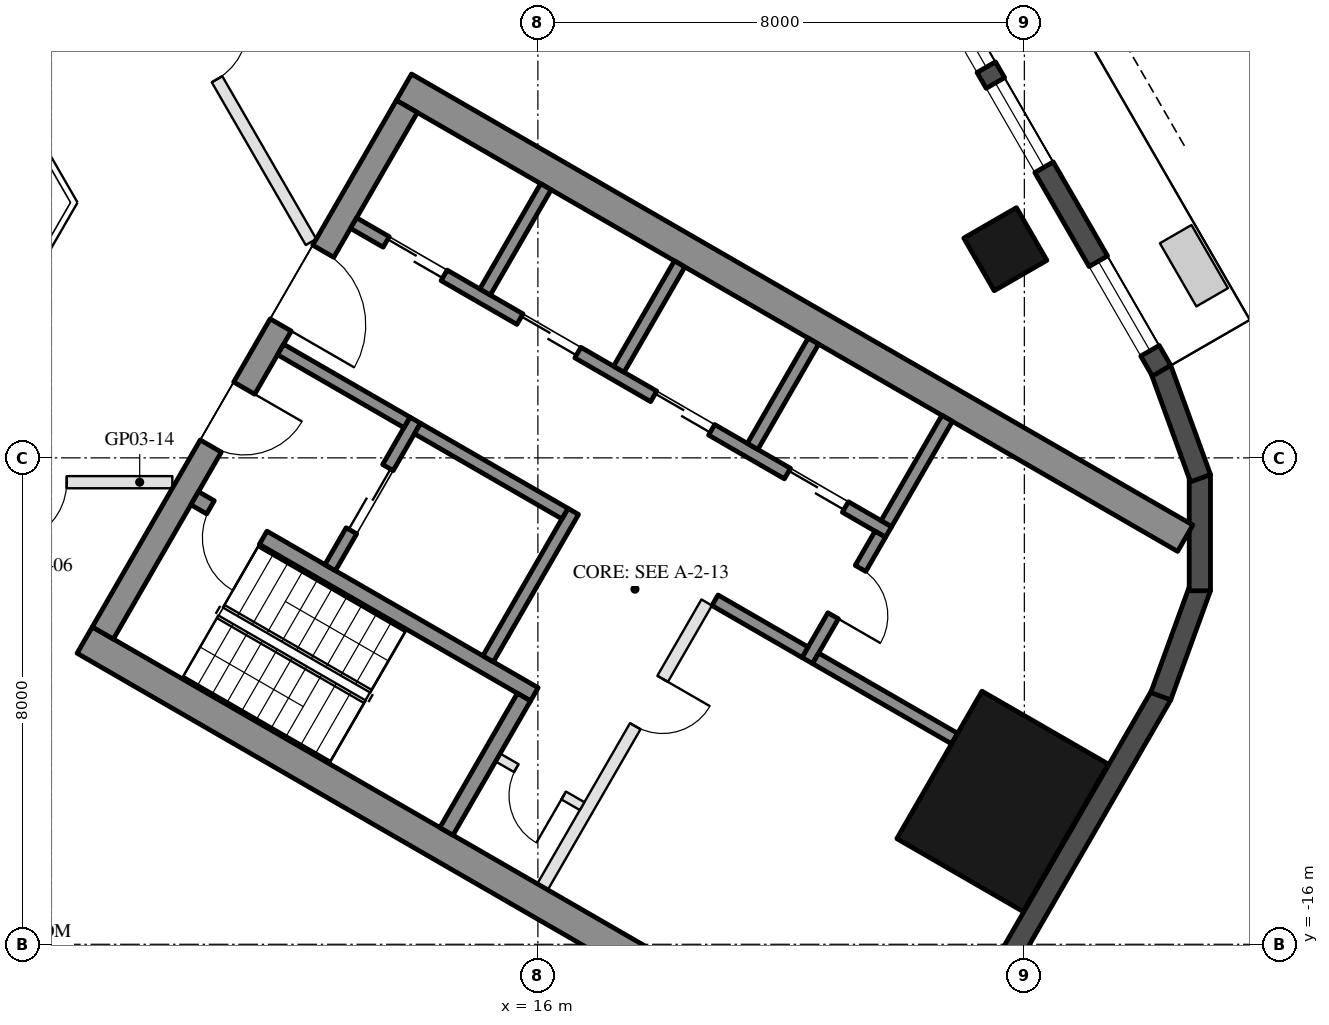
"""IFC4 building model, lengths in metres.
Left out: names, types, materials, properties, quantities, classifications, styles, units other than length and angle.
Written with IfcOpenShell. Run it as: python <this file> out.ifc"""

import sys

from ifc_helpers import new_model, si_unit, direction, frame, frame_2d, origin, origin_2d, place, context, subcontext, project, spatial, rectangle, hollow_rectangle, extrude, element, fill, save


model = new_model("IFC4")
c1 = context("Model", 3, precision=1e-05, world=origin(), true_north=direction((0.0, 1.0)))
c2 = subcontext(c1, "Body", "Model", "MODEL_VIEW")
j1 = project(units=[si_unit("LENGTHUNIT", "METRE"), si_unit("PLANEANGLEUNIT", "RADIAN")], contexts=[c1])
p1 = place(None, origin())
s1 = spatial("IfcSite", under=j1, at=p1, CompositionType="ELEMENT")
p2 = place(p1, origin())
s2 = spatial("IfcBuilding", under=s1, at=p2, CompositionType="ELEMENT")
p3 = place(p2, frame((0.0, 0.0, 61.3)))
s3 = spatial("IfcBuildingStorey", under=s2, at=p3, CompositionType="ELEMENT", Elevation=61.3)
p4 = place(p3, frame((23.688, -4.568, 0.0), z_axis=(0.0, 0.0, 1.0), x_axis=(-0.5, 0.866025403784, 0.0)))
e1 = element("IfcColumn", 1, at=p4, inside=s3, PredefinedType="COLUMN", context=c2, shape_type="SweptSolid", body=[
    extrude(hollow_rectangle(XDim=1.0, YDim=1.0, WallThickness=0.045, at=origin_2d()), origin(), (0.0, 0.0, 1.0), 3.7),
])
p5 = place(p3, frame((23.643, -13.65, 0.0), z_axis=(0.0, 0.0, 1.0), x_axis=(0.5, 0.866025403784, 0.0)))
e2 = element("IfcColumn", 2, at=p5, inside=s3, PredefinedType="COLUMN", context=c2, shape_type="SweptSolid", body=[
    extrude(hollow_rectangle(XDim=2.8, YDim=2.4, WallThickness=0.07, at=origin_2d()), origin(), (0.0, 0.0, 1.0), 3.7),
])
p6 = place(p3, frame((23.427, -16.792, 0.0), z_axis=(0.0, 0.0, 1.0), x_axis=(0.500018773155, 0.866014564827, 0.0)))
e3 = element("IfcWall", 3, at=p6, inside=s3, PredefinedType="SOLIDWALL", context=c2, shape_type="SweptSolid", body=[
    extrude(rectangle(XDim=5.658, YDim=0.35, at=frame_2d((2.829, 0.0))), origin(), (0.0, 0.0, 1.0), 3.55),
])
for number, where, z_axis, x_axis in (
    (4, (26.244, -11.92, 0.0), (0.0, 0.0, 1.0), (0.342, 0.94, 0.0)),
    (5, (26.886, -10.185, 0.0), (0.0, 0.0, 1.0), (0.0, 1.0, 0.0)),
    (6, (26.897, -8.335, 0.0), (0.0, 0.0, 1.0), (-0.342, 0.94, 0.0)),
):
    element("IfcWall", number, at=place(p3, frame(where, z_axis=z_axis, x_axis=x_axis)), inside=s3, PredefinedType="SOLIDWALL", context=c2, shape_type="SweptSolid", body=[
        extrude(rectangle(XDim=1.91, YDim=0.35, at=frame_2d((0.955, 0.0))), origin(), (0.0, 0.0, 1.0), 3.55),
    ])
p7 = place(p3, frame((26.257, -6.567, 0.0), z_axis=(0.0, 0.0, 1.0), x_axis=(-0.500023526245, 0.866011820475, 0.0)))
e7 = element("IfcWall", 7, at=p7, inside=s3, PredefinedType="SOLIDWALL", context=c2, shape_type="SweptSolid", body=[
    extrude(rectangle(XDim=11.816, YDim=0.35, at=frame_2d((5.908, 0.0))), origin(), (0.0, 0.0, 1.0), 3.55),
])
p8 = place(p7, frame((0.38, 0.0, 0.3)))
e8 = element("IfcOpeningElement", 8, at=p8, cuts=e7, PredefinedType="OPENING", context=c2, shape_type="SweptSolid", body=[
    extrude(rectangle(XDim=1.7, YDim=2.65, at=frame_2d((0.85, 1.325))), frame((0.0, 0.185, 0.0), z_axis=(0.0, -1.0, 0.0), x_axis=(1.0, 0.0, 0.0)), (0.0, 0.0, 1.0), 0.37),
])
p9 = place(p7, frame((7.666, 0.0, 0.0)))
e9 = element("IfcOpeningElement", 9, at=p9, cuts=e7, PredefinedType="OPENING", context=c2, shape_type="SweptSolid", body=[
    extrude(rectangle(XDim=2.4, YDim=2.4, at=frame_2d((1.2, 1.2))), frame((0.0, 0.185, 0.0), z_axis=(0.0, -1.0, 0.0), x_axis=(1.0, 0.0, 0.0)), (0.0, 0.0, 1.0), 0.37),
])
p10 = place(p7, frame((3.865, 0.0, 0.3)))
e10 = element("IfcOpeningElement", 10, at=p10, cuts=e7, PredefinedType="OPENING", context=c2, shape_type="SweptSolid", body=[
    extrude(rectangle(XDim=1.6, YDim=2.65, at=frame_2d((0.8, 1.325))), frame((0.0, 0.185, 0.0), z_axis=(0.0, -1.0, 0.0), x_axis=(1.0, 0.0, 0.0)), (0.0, 0.0, 1.0), 0.37),
])
p11 = place(p7, frame((5.765, 0.0, 0.3)))
e11 = element("IfcOpeningElement", 11, at=p11, cuts=e7, PredefinedType="OPENING", context=c2, shape_type="SweptSolid", body=[
    extrude(rectangle(XDim=1.6, YDim=2.65, at=frame_2d((0.8, 1.325))), frame((0.0, 0.185, 0.0), z_axis=(0.0, -1.0, 0.0), x_axis=(1.0, 0.0, 0.0)), (0.0, 0.0, 1.0), 0.37),
])
for number, where, z_axis, x_axis in (
    (12, (8.547, -10.997, 0.0), (0.0, 0.0, 1.0), (0.866, -0.5, 0.0)),
    (13, (13.797, -1.903, 0.0), (0.0, 0.0, 1.0), (0.866, -0.5, 0.0)),
):
    element("IfcWall", number, at=place(p3, frame(where, z_axis=z_axis, x_axis=x_axis)), inside=s3, PredefinedType="SHEAR", context=c2, shape_type="SweptSolid", body=[
        extrude(rectangle(XDim=14.837, YDim=0.5, at=frame_2d((7.418, 0.0))), origin(), (0.0, 0.0, 1.0), 3.5),
    ])
p12 = place(p3, frame((8.845, -10.88, 0.0), z_axis=(0.0, 0.0, 1.0), x_axis=(0.500004234368, 0.866022959057, 0.0)))
e14 = element("IfcWall", 14, at=p12, inside=s3, PredefinedType="SHEAR", context=c2, shape_type="SweptSolid", body=[
    extrude(rectangle(XDim=10.0, YDim=0.4, at=frame_2d((5.0, 0.0))), origin(), (0.0, 0.0, 1.0), 3.5),
])
p13 = place(p12, frame((3.55, 0.0, 0.0)))
e15 = element("IfcOpeningElement", 15, at=p13, cuts=e14, PredefinedType="OPENING", context=c2, shape_type="SweptSolid", body=[
    extrude(rectangle(XDim=1.1, YDim=2.1, at=frame_2d((0.55, 1.05))), frame((0.0, 0.21, 0.0), z_axis=(0.0, -1.0, 0.0), x_axis=(1.0, 0.0, 0.0)), (0.0, 0.0, 1.0), 0.42),
])
p14 = place(p12, frame((5.85, 0.0, 0.0)))
e16 = element("IfcOpeningElement", 16, at=p14, cuts=e14, PredefinedType="OPENING", context=c2, shape_type="SweptSolid", body=[
    extrude(rectangle(XDim=1.4, YDim=2.1, at=frame_2d((0.7, 1.05))), frame((0.0, 0.21, 0.0), z_axis=(0.0, -1.0, 0.0), x_axis=(1.0, 0.0, 0.0)), (0.0, 0.0, 1.0), 0.42),
])
p15 = place(p3, frame((10.356, -8.664, 0.0), z_axis=(0.0, 0.0, 1.0), x_axis=(0.866028629588, -0.499994412703, 0.0)))
e17 = element("IfcWall", 17, at=p15, inside=s3, PredefinedType="SHEAR", context=c2, shape_type="SweptSolid", body=[
    extrude(rectangle(XDim=6.45, YDim=0.25, at=frame_2d((3.225, 0.0))), origin(), (0.0, 0.0, 1.0), 3.5),
])
p16 = place(p15, frame((0.3, 0.0, 0.0)))
e18 = element("IfcOpeningElement", 18, at=p16, cuts=e17, PredefinedType="OPENING", context=c2, shape_type="SweptSolid", body=[
    extrude(rectangle(XDim=1.0, YDim=2.1, at=frame_2d((0.5, 1.05))), frame((0.0, 0.135, 0.0), z_axis=(0.0, -1.0, 0.0), x_axis=(1.0, 0.0, 0.0)), (0.0, 0.0, 1.0), 0.27),
])
p17 = place(p3, frame((14.496, -14.143, 0.0), z_axis=(0.0, 0.0, 1.0), x_axis=(0.500062241894, 0.865989465428, 0.0)))
e19 = element("IfcWall", 19, at=p17, inside=s3, PredefinedType="SHEAR", context=c2, shape_type="SweptSolid", body=[
    extrude(rectangle(XDim=2.55, YDim=0.25, at=frame_2d((1.275, 0.0))), origin(), (0.0, 0.0, 1.0), 3.5),
])
p18 = place(p3, frame((15.181, -11.305, 0.0), z_axis=(0.0, 0.0, 1.0), x_axis=(0.49994636267, 0.866056369097, 0.0)))
e20 = element("IfcWall", 20, at=p18, inside=s3, PredefinedType="SHEAR", context=c2, shape_type="SweptSolid", body=[
    extrude(rectangle(XDim=2.8, YDim=0.2, at=frame_2d((1.4, 0.0))), origin(), (0.0, 0.0, 1.0), 3.5),
])
p19 = place(p3, frame((12.583, -9.805, 0.0), z_axis=(0.0, 0.0, 1.0), x_axis=(0.49994636267, 0.866056369097, 0.0)))
e21 = element("IfcWall", 21, at=p19, inside=s3, PredefinedType="SHEAR", context=c2, shape_type="SweptSolid", body=[
    extrude(rectangle(XDim=2.8, YDim=0.2, at=frame_2d((1.4, 0.0))), origin(), (0.0, 0.0, 1.0), 3.5),
])
p20 = place(p19, frame((0.7, 0.0, 0.0)))
e22 = element("IfcOpeningElement", 22, at=p20, cuts=e21, PredefinedType="OPENING", context=c2, shape_type="SweptSolid", body=[
    extrude(rectangle(XDim=1.2, YDim=2.1, at=frame_2d((0.6, 1.05))), frame((0.0, 0.11, 0.0), z_axis=(0.0, -1.0, 0.0), x_axis=(1.0, 0.0, 0.0)), (0.0, 0.0, 1.0), 0.22),
])
p21 = place(p3, frame((11.768, -6.217, 0.0), z_axis=(0.0, 0.0, 1.0), x_axis=(0.866050077142, -0.499957262057, 0.0)))
e23 = element("IfcWall", 23, at=p21, inside=s3, PredefinedType="SHEAR", context=c2, shape_type="SweptSolid", body=[
    extrude(rectangle(XDim=2.4, YDim=0.2, at=frame_2d((1.2, 0.0))), origin(), (0.0, 0.0, 1.0), 3.5),
])
p22 = place(p3, frame((14.02, -7.517, 0.0), z_axis=(0.0, 0.0, 1.0), x_axis=(0.866034573852, -0.49998411664, 0.0)))
e24 = element("IfcWall", 24, at=p22, inside=s3, PredefinedType="SHEAR", context=c2, shape_type="SweptSolid", body=[
    extrude(rectangle(XDim=2.8, YDim=0.2, at=frame_2d((1.4, 0.0))), origin(), (0.0, 0.0, 1.0), 3.5),
])
p23 = place(p3, frame((12.968, -4.138, 0.0), z_axis=(0.0, 0.0, 1.0), x_axis=(0.866028328073, -0.49999493495, 0.0)))
e25 = element("IfcWall", 25, at=p23, inside=s3, PredefinedType="SHEAR", context=c2, shape_type="SweptSolid", body=[
    extrude(rectangle(XDim=10.16, YDim=0.2, at=frame_2d((5.08, 0.0))), origin(), (0.0, 0.0, 1.0), 3.5),
])
p24 = place(p23, frame((0.62, 0.0, 0.0)))
e26 = element("IfcOpeningElement", 26, at=p24, cuts=e25, PredefinedType="OPENING", context=c2, shape_type="SweptSolid", body=[
    extrude(rectangle(XDim=1.1, YDim=2.1, at=frame_2d((0.55, 1.05))), frame((0.0, 0.11, 0.0), z_axis=(0.0, -1.0, 0.0), x_axis=(1.0, 0.0, 0.0)), (0.0, 0.0, 1.0), 0.22),
])
p25 = place(p23, frame((3.16, 0.0, 0.0)))
e27 = element("IfcOpeningElement", 27, at=p25, cuts=e25, PredefinedType="OPENING", context=c2, shape_type="SweptSolid", body=[
    extrude(rectangle(XDim=1.1, YDim=2.1, at=frame_2d((0.55, 1.05))), frame((0.0, 0.11, 0.0), z_axis=(0.0, -1.0, 0.0), x_axis=(1.0, 0.0, 0.0)), (0.0, 0.0, 1.0), 0.22),
])
p26 = place(p23, frame((5.7, 0.0, 0.0)))
e28 = element("IfcOpeningElement", 28, at=p26, cuts=e25, PredefinedType="OPENING", context=c2, shape_type="SweptSolid", body=[
    extrude(rectangle(XDim=1.1, YDim=2.1, at=frame_2d((0.55, 1.05))), frame((0.0, 0.11, 0.0), z_axis=(0.0, -1.0, 0.0), x_axis=(1.0, 0.0, 0.0)), (0.0, 0.0, 1.0), 0.22),
])
p27 = place(p23, frame((8.24, 0.0, 0.0)))
e29 = element("IfcOpeningElement", 29, at=p27, cuts=e25, PredefinedType="OPENING", context=c2, shape_type="SweptSolid", body=[
    extrude(rectangle(XDim=1.1, YDim=2.1, at=frame_2d((0.55, 1.05))), frame((0.0, 0.11, 0.0), z_axis=(0.0, -1.0, 0.0), x_axis=(1.0, 0.0, 0.0)), (0.0, 0.0, 1.0), 0.22),
])
p28 = place(p3, frame((20.43, -11.333, 0.0), z_axis=(0.0, 0.0, 1.0), x_axis=(0.500001309137, 0.866024647952, 0.0)))
e30 = element("IfcWall", 30, at=p28, inside=s3, PredefinedType="SHEAR", context=c2, shape_type="SweptSolid", body=[
    extrude(rectangle(XDim=2.4, YDim=0.2, at=frame_2d((1.2, 0.0))), origin(), (0.0, 0.0, 1.0), 3.5),
])
p29 = place(p28, frame((0.85, 0.0, 0.0)))
e31 = element("IfcOpeningElement", 31, at=p29, cuts=e30, PredefinedType="OPENING", context=c2, shape_type="SweptSolid", body=[
    extrude(rectangle(XDim=0.9, YDim=2.1, at=frame_2d((0.45, 1.05))), frame((0.0, 0.11, 0.0), z_axis=(0.0, -1.0, 0.0), x_axis=(1.0, 0.0, 0.0)), (0.0, 0.0, 1.0), 0.22),
])
p30 = place(p3, frame((18.913, -10.342, 0.0), z_axis=(0.0, 0.0, 1.0), x_axis=(0.866038183914, -0.499977863513, 0.0)))
e32 = element("IfcWall", 32, at=p30, inside=s3, PredefinedType="SHEAR", context=c2, shape_type="SweptSolid", body=[
    extrude(rectangle(XDim=1.71, YDim=0.2, at=frame_2d((0.855, 0.0))), origin(), (0.0, 0.0, 1.0), 3.5),
])
for number, where, z_axis, x_axis in (
    (33, (15.131, -5.272, 0.0), (0.0, 0.0, 1.0), (0.5, 0.866, 0.0)),
    (34, (17.331, -6.542, 0.0), (0.0, 0.0, 1.0), (0.5, 0.866, 0.0)),
    (35, (19.531, -7.812, 0.0), (0.0, 0.0, 1.0), (0.5, 0.866, 0.0)),
    (36, (21.73, -9.082, 0.0), (0.0, 0.0, 1.0), (0.5, 0.866, 0.0)),
):
    element("IfcWall", number, at=place(p3, frame(where, z_axis=z_axis, x_axis=x_axis)), inside=s3, PredefinedType="SHEAR", context=c2, shape_type="SweptSolid", body=[
        extrude(rectangle(XDim=2.0, YDim=0.2, at=frame_2d((1.0, 0.0))), origin(), (0.0, 0.0, 1.0), 3.5),
    ])
p31 = place(p3, frame((20.567, -11.297, 0.0), z_axis=(0.0, 0.0, 1.0), x_axis=(0.866060851709, -0.499938597367, 0.0)))
e37 = element("IfcWall", 37, at=p31, inside=s3, PredefinedType="SHEAR", context=c2, shape_type="SweptSolid", body=[
    extrude(rectangle(XDim=2.64, YDim=0.2, at=frame_2d((1.32, 0.0))), origin(), (0.0, 0.0, 1.0), 3.5),
])
p32 = place(p3, frame((16.076, -15.055, 0.0), z_axis=(0.0, 0.0, 1.0), x_axis=(0.499995103361, 0.866028230842, 0.0)))
e38 = element("IfcWall", 38, at=p32, inside=s3, PredefinedType="PARTITIONING", context=c2, shape_type="SweptSolid", body=[
    extrude(rectangle(XDim=5.4, YDim=0.2, at=frame_2d((2.7, 0.0))), origin(), (0.0, 0.0, 1.0), 3.5),
])
p33 = place(p32, frame((3.05, 0.0, 0.0)))
e39 = element("IfcOpeningElement", 39, at=p33, cuts=e38, PredefinedType="OPENING", context=c2, shape_type="SweptSolid", body=[
    extrude(rectangle(XDim=0.9, YDim=2.1, at=frame_2d((0.45, 1.05))), frame((0.0, 0.11, 0.0), z_axis=(0.0, -1.0, 0.0), x_axis=(1.0, 0.0, 0.0)), (0.0, 0.0, 1.0), 0.22),
])
p34 = place(p3, frame((15.342, -12.928, 0.0), z_axis=(0.0, 0.0, 1.0), x_axis=(0.865989903783, -0.500061482766, 0.0)))
e40 = element("IfcWall", 40, at=p34, inside=s3, PredefinedType="PARTITIONING", context=c2, shape_type="SweptSolid", body=[
    extrude(rectangle(XDim=1.6, YDim=0.15, at=frame_2d((0.8, 0.0))), origin(), (0.0, 0.0, 1.0), 3.5),
])
p35 = place(p34, frame((0.35, 0.0, 0.0)))
e41 = element("IfcOpeningElement", 41, at=p35, cuts=e40, PredefinedType="OPENING", context=c2, shape_type="SweptSolid", body=[
    extrude(rectangle(XDim=0.9, YDim=2.1, at=frame_2d((0.45, 1.05))), frame((0.0, 0.085, 0.0), z_axis=(0.0, -1.0, 0.0), x_axis=(1.0, 0.0, 0.0)), (0.0, 0.0, 1.0), 0.17),
])
p36 = place(p3, frame((9.988, -8.4, 0.0), z_axis=(0.0, 0.0, 1.0), x_axis=(-1.0, 0.0, 0.0)))
e42 = element("IfcWall", 42, at=p36, inside=s3, PredefinedType="PARTITIONING", context=c2, shape_type="SweptSolid", body=[
    extrude(rectangle(XDim=4.474, YDim=0.2, at=frame_2d((2.237, 0.0))), origin(), (0.0, 0.0, 1.0), 2.95),
])
p37 = place(p36, frame((1.737, 0.0, 0.0)))
e43 = element("IfcOpeningElement", 43, at=p37, cuts=e42, PredefinedType="OPENING", context=c2, shape_type="SweptSolid", body=[
    extrude(rectangle(XDim=1.0, YDim=2.1, at=frame_2d((0.5, 1.05))), frame((0.0, 0.11, 0.0), z_axis=(0.0, -1.0, 0.0), x_axis=(1.0, 0.0, 0.0)), (0.0, 0.0, 1.0), 0.22),
])
p38 = place(p3, frame((8.677, 1.771, 0.0), z_axis=(0.0, 0.0, 1.0), x_axis=(0.50000293509, -0.866023709203, 0.0)))
e44 = element("IfcWall", 44, at=p38, inside=s3, PredefinedType="PARTITIONING", context=c2, shape_type="SweptSolid", body=[
    extrude(rectangle(XDim=7.183, YDim=0.2, at=frame_2d((3.592, 0.0))), origin(), (0.0, 0.0, 1.0), 2.95),
])
p39 = place(p38, frame((3.092, 0.0, 0.0)))
e45 = element("IfcOpeningElement", 45, at=p39, cuts=e44, PredefinedType="OPENING", context=c2, shape_type="SweptSolid", body=[
    extrude(rectangle(XDim=1.0, YDim=2.1, at=frame_2d((0.5, 1.05))), frame((0.0, 0.11, 0.0), z_axis=(0.0, -1.0, 0.0), x_axis=(1.0, 0.0, 0.0)), (0.0, 0.0, 1.0), 0.22),
])
p40 = place(p8, origin())
e46 = element("IfcWindow", 46, at=p40, inside=s3, PartitioningType="SINGLE_PANEL", PredefinedType="WINDOW", context=c2, shape_type="SweptSolid", body=[
    extrude(rectangle(XDim=1.7, YDim=2.65, at=frame_2d((0.85, 1.325))), frame((0.0, 0.03, 0.0), z_axis=(0.0, -1.0, 0.0), x_axis=(1.0, 0.0, 0.0)), (0.0, 0.0, 1.0), 0.06),
])
fill(e8, e46)
p41 = place(p10, origin())
e47 = element("IfcWindow", 47, at=p41, inside=s3, PartitioningType="SINGLE_PANEL", PredefinedType="WINDOW", context=c2, shape_type="SweptSolid", body=[
    extrude(rectangle(XDim=1.6, YDim=2.65, at=frame_2d((0.8, 1.325))), frame((0.0, 0.03, 0.0), z_axis=(0.0, -1.0, 0.0), x_axis=(1.0, 0.0, 0.0)), (0.0, 0.0, 1.0), 0.06),
])
fill(e10, e47)
p42 = place(p11, origin())
e48 = element("IfcWindow", 48, at=p42, inside=s3, PartitioningType="SINGLE_PANEL", PredefinedType="WINDOW", context=c2, shape_type="SweptSolid", body=[
    extrude(rectangle(XDim=1.6, YDim=2.65, at=frame_2d((0.8, 1.325))), frame((0.0, 0.03, 0.0), z_axis=(0.0, -1.0, 0.0), x_axis=(1.0, 0.0, 0.0)), (0.0, 0.0, 1.0), 0.06),
])
fill(e11, e48)
p43 = place(p20, origin())
e49 = element("IfcDoor", 49, at=p43, inside=s3, OperationType="DOUBLE_DOOR_SLIDING", PredefinedType="DOOR", context=c2, shape_type="SweptSolid", body=[
    extrude(rectangle(XDim=1.2, YDim=2.1, at=frame_2d((0.6, 1.05))), frame((0.0, 0.025, 0.0), z_axis=(0.0, -1.0, 0.0), x_axis=(1.0, 0.0, 0.0)), (0.0, 0.0, 1.0), 0.05),
])
fill(e22, e49)
p44 = place(p35, frame((0.9, 0.0, 0.0), z_axis=(0.0, 0.0, 1.0), x_axis=(-1.0, 0.0, 0.0)))
e50 = element("IfcDoor", 50, at=p44, inside=s3, OperationType="SINGLE_SWING_LEFT", PredefinedType="DOOR", context=c2, shape_type="SweptSolid", body=[
    extrude(rectangle(XDim=0.9, YDim=2.1, at=frame_2d((0.45, 1.05))), frame((0.0, 0.025, 0.0), z_axis=(0.0, -1.0, 0.0), x_axis=(1.0, 0.0, 0.0)), (0.0, 0.0, 1.0), 0.05),
])
fill(e41, e50)
p45 = place(p24, origin())
e51 = element("IfcDoor", 51, at=p45, inside=s3, OperationType="DOUBLE_DOOR_SLIDING", PredefinedType="DOOR", context=c2, shape_type="SweptSolid", body=[
    extrude(rectangle(XDim=1.1, YDim=2.1, at=frame_2d((0.55, 1.05))), frame((0.0, 0.025, 0.0), z_axis=(0.0, -1.0, 0.0), x_axis=(1.0, 0.0, 0.0)), (0.0, 0.0, 1.0), 0.05),
])
fill(e26, e51)
p46 = place(p25, origin())
e52 = element("IfcDoor", 52, at=p46, inside=s3, OperationType="DOUBLE_DOOR_SLIDING", PredefinedType="DOOR", context=c2, shape_type="SweptSolid", body=[
    extrude(rectangle(XDim=1.1, YDim=2.1, at=frame_2d((0.55, 1.05))), frame((0.0, 0.025, 0.0), z_axis=(0.0, -1.0, 0.0), x_axis=(1.0, 0.0, 0.0)), (0.0, 0.0, 1.0), 0.05),
])
fill(e27, e52)
p47 = place(p26, origin())
e53 = element("IfcDoor", 53, at=p47, inside=s3, OperationType="DOUBLE_DOOR_SLIDING", PredefinedType="DOOR", context=c2, shape_type="SweptSolid", body=[
    extrude(rectangle(XDim=1.1, YDim=2.1, at=frame_2d((0.55, 1.05))), frame((0.0, 0.025, 0.0), z_axis=(0.0, -1.0, 0.0), x_axis=(1.0, 0.0, 0.0)), (0.0, 0.0, 1.0), 0.05),
])
fill(e28, e53)
p48 = place(p27, origin())
e54 = element("IfcDoor", 54, at=p48, inside=s3, OperationType="DOUBLE_DOOR_SLIDING", PredefinedType="DOOR", context=c2, shape_type="SweptSolid", body=[
    extrude(rectangle(XDim=1.1, YDim=2.1, at=frame_2d((0.55, 1.05))), frame((0.0, 0.025, 0.0), z_axis=(0.0, -1.0, 0.0), x_axis=(1.0, 0.0, 0.0)), (0.0, 0.0, 1.0), 0.05),
])
fill(e29, e54)
p49 = place(p29, frame((0.9, 0.0, 0.0), z_axis=(0.0, 0.0, 1.0), x_axis=(-1.0, 0.0, 0.0)))
e55 = element("IfcDoor", 55, at=p49, inside=s3, OperationType="SINGLE_SWING_RIGHT", PredefinedType="DOOR", context=c2, shape_type="SweptSolid", body=[
    extrude(rectangle(XDim=0.9, YDim=2.1, at=frame_2d((0.45, 1.05))), frame((0.0, 0.025, 0.0), z_axis=(0.0, -1.0, 0.0), x_axis=(1.0, 0.0, 0.0)), (0.0, 0.0, 1.0), 0.05),
])
fill(e31, e55)
p50 = place(p33, frame((0.9, 0.0, 0.0), z_axis=(0.0, 0.0, 1.0), x_axis=(-1.0, 0.0, 0.0)))
e56 = element("IfcDoor", 56, at=p50, inside=s3, OperationType="SINGLE_SWING_LEFT", PredefinedType="DOOR", context=c2, shape_type="SweptSolid", body=[
    extrude(rectangle(XDim=0.9, YDim=2.1, at=frame_2d((0.45, 1.05))), frame((0.0, 0.025, 0.0), z_axis=(0.0, -1.0, 0.0), x_axis=(1.0, 0.0, 0.0)), (0.0, 0.0, 1.0), 0.05),
])
fill(e39, e56)
p51 = place(p13, frame((1.1, 0.0, 0.0), z_axis=(0.0, 0.0, 1.0), x_axis=(-1.0, 0.0, 0.0)))
e57 = element("IfcDoor", 57, at=p51, inside=s3, OperationType="SINGLE_SWING_LEFT", PredefinedType="DOOR", context=c2, shape_type="SweptSolid", body=[
    extrude(rectangle(XDim=1.1, YDim=2.1, at=frame_2d((0.55, 1.05))), frame((0.0, 0.025, 0.0), z_axis=(0.0, -1.0, 0.0), x_axis=(1.0, 0.0, 0.0)), (0.0, 0.0, 1.0), 0.05),
])
fill(e15, e57)
p52 = place(p14, frame((1.4, 0.0, 0.0), z_axis=(0.0, 0.0, 1.0), x_axis=(-1.0, 0.0, 0.0)))
e58 = element("IfcDoor", 58, at=p52, inside=s3, OperationType="DOUBLE_DOOR_SINGLE_SWING", PredefinedType="DOOR", context=c2, shape_type="SweptSolid", body=[
    extrude(rectangle(XDim=1.4, YDim=2.1, at=frame_2d((0.7, 1.05))), frame((0.0, 0.025, 0.0), z_axis=(0.0, -1.0, 0.0), x_axis=(1.0, 0.0, 0.0)), (0.0, 0.0, 1.0), 0.05),
])
fill(e16, e58)
p53 = place(p16, frame((1.0, 0.0, 0.0), z_axis=(0.0, 0.0, 1.0), x_axis=(-1.0, 0.0, 0.0)))
e59 = element("IfcDoor", 59, at=p53, inside=s3, OperationType="SINGLE_SWING_LEFT", PredefinedType="DOOR", context=c2, shape_type="SweptSolid", body=[
    extrude(rectangle(XDim=1.0, YDim=2.1, at=frame_2d((0.5, 1.05))), frame((0.0, 0.025, 0.0), z_axis=(0.0, -1.0, 0.0), x_axis=(1.0, 0.0, 0.0)), (0.0, 0.0, 1.0), 0.05),
])
fill(e18, e59)
p54 = place(p37, origin())
e60 = element("IfcDoor", 60, at=p54, inside=s3, OperationType="SINGLE_SWING_RIGHT", PredefinedType="DOOR", context=c2, shape_type="SweptSolid", body=[
    extrude(rectangle(XDim=1.0, YDim=2.1, at=frame_2d((0.5, 1.05))), frame((0.0, 0.025, 0.0), z_axis=(0.0, -1.0, 0.0), x_axis=(1.0, 0.0, 0.0)), (0.0, 0.0, 1.0), 0.05),
])
fill(e43, e60)
p55 = place(p39, origin())
e61 = element("IfcDoor", 61, at=p55, inside=s3, OperationType="SINGLE_SWING_LEFT", PredefinedType="DOOR", context=c2, shape_type="SweptSolid", body=[
    extrude(rectangle(XDim=1.0, YDim=2.1, at=frame_2d((0.5, 1.05))), frame((0.0, 0.025, 0.0), z_axis=(0.0, -1.0, 0.0), x_axis=(1.0, 0.0, 0.0)), (0.0, 0.0, 1.0), 0.05),
])
fill(e45, e61)
save(model, sys.argv[1])
